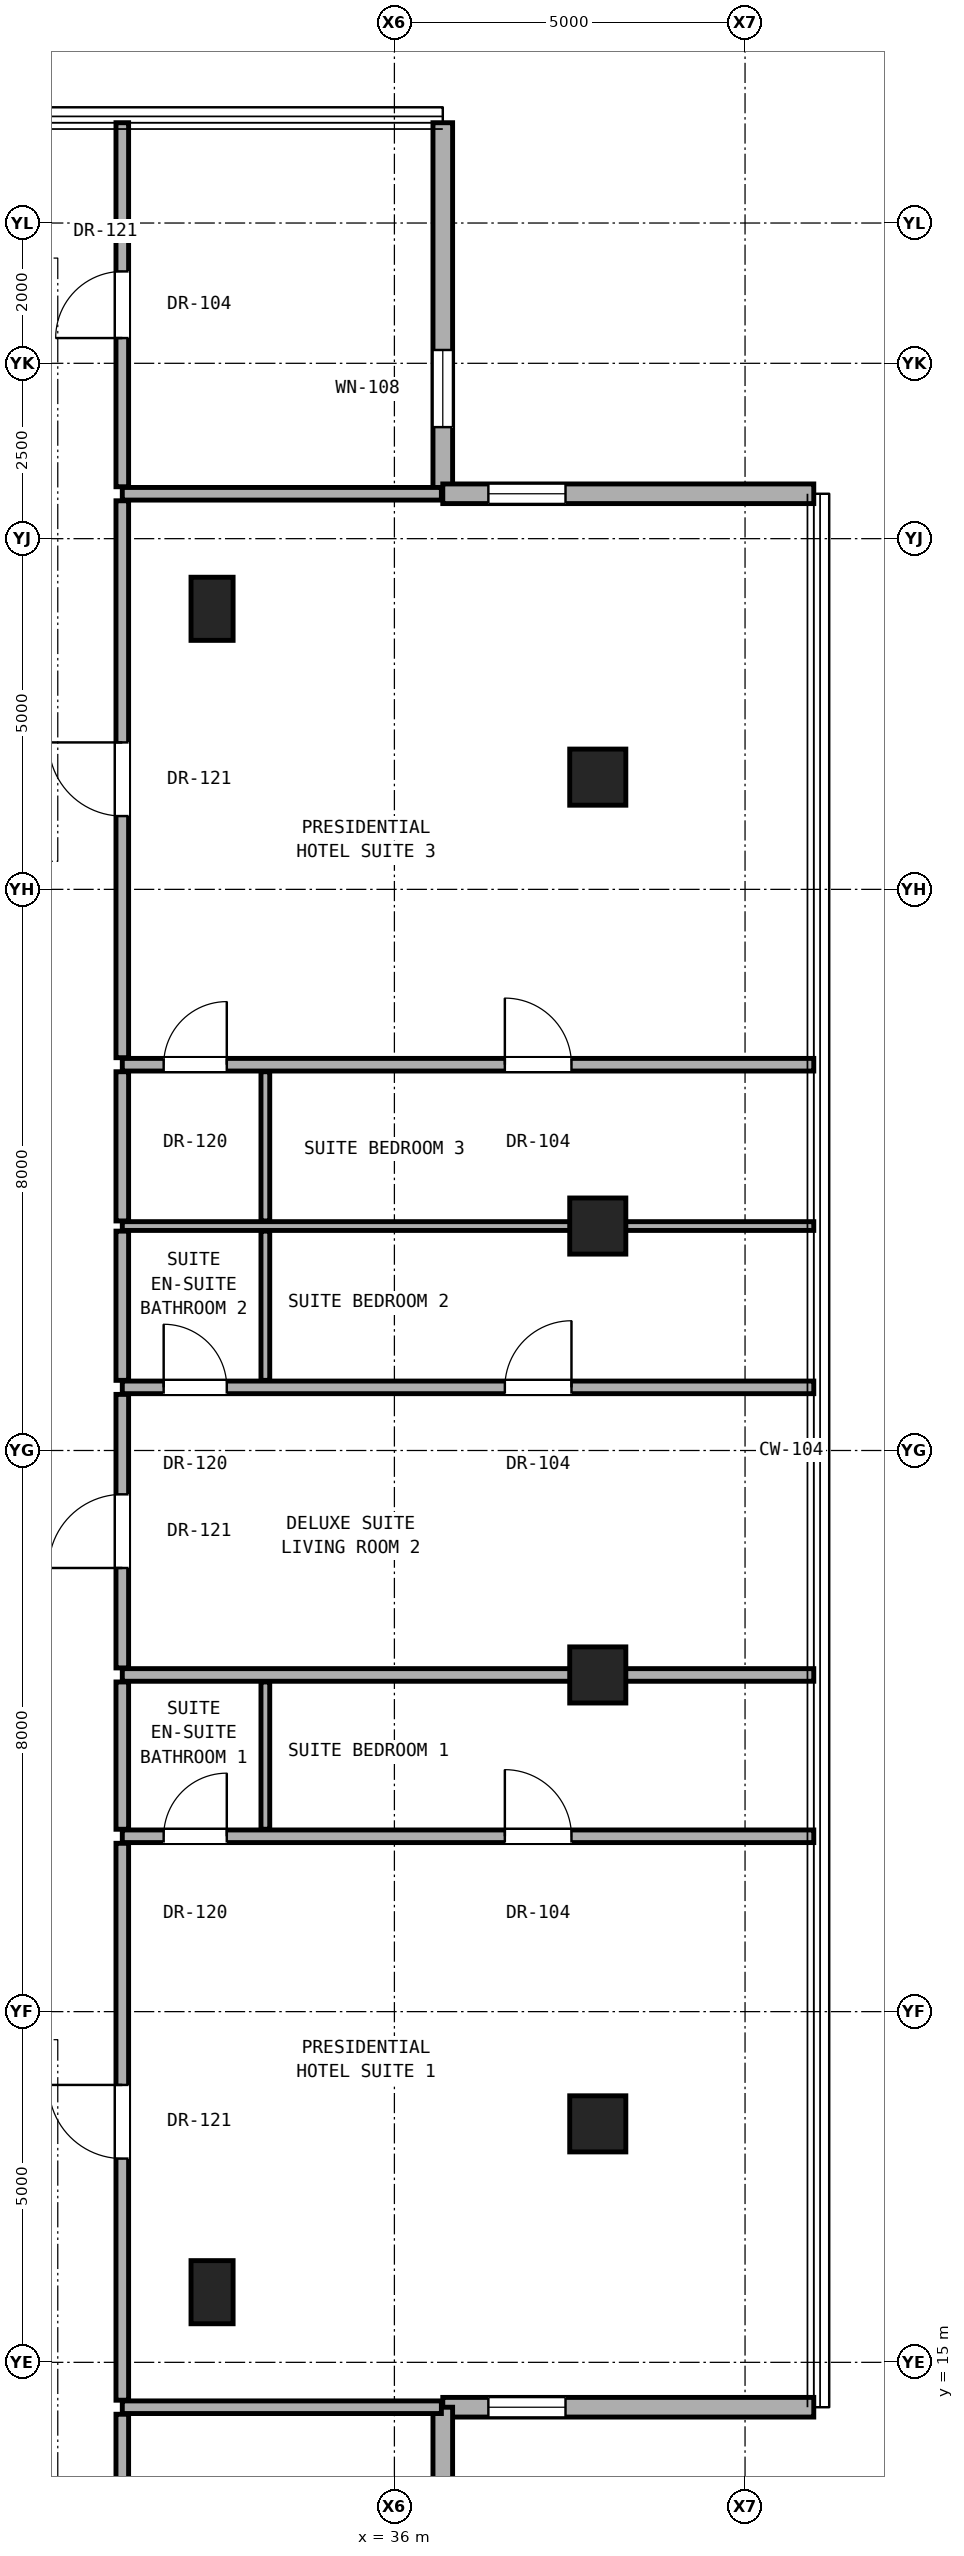
"""IFC4 building model, lengths in metres.
Left out: names, types, materials, properties, quantities, classifications, styles, units other than length and angle.
Written with IfcOpenShell. Run it as: python <this file> out.ifc"""

import sys

from ifc_helpers import new_model, si_unit, direction, frame, frame_2d, origin, origin_2d, place, context, subcontext, project, spatial, rectangle, hollow_rectangle, extrude, element, fill, save


model = new_model("IFC4")
c1 = context("Model", 3, precision=1e-05, world=origin(), true_north=direction((0.0, 1.0)))
c2 = subcontext(c1, "Body", "Model", "MODEL_VIEW")
j1 = project(units=[si_unit("LENGTHUNIT", "METRE"), si_unit("PLANEANGLEUNIT", "RADIAN")], contexts=[c1])
p1 = place(None, origin())
s1 = spatial("IfcSite", under=j1, at=p1, CompositionType="ELEMENT")
p2 = place(p1, origin())
s2 = spatial("IfcBuilding", under=s1, at=p2, CompositionType="ELEMENT")
p3 = place(p2, frame((0.0, 0.0, 235.9)))
s3 = spatial("IfcBuildingStorey", under=s2, at=p3, CompositionType="ELEMENT", Elevation=235.9)
for number, where, z_axis, x_axis in (
    (1, (38.9, 18.4, 0.0), (0.0, 0.0, 1.0), (1.0, 0.0, 0.0)),
    (2, (38.9, 24.8, 0.0), (0.0, 0.0, 1.0), (1.0, 0.0, 0.0)),
    (3, (38.9, 31.2, 0.0), (0.0, 0.0, 1.0), (1.0, 0.0, 0.0)),
    (4, (38.9, 37.6, 0.0), (0.0, 0.0, 1.0), (1.0, 0.0, 0.0)),
):
    element("IfcColumn", number, at=place(p3, frame(where, z_axis=z_axis, x_axis=x_axis)), inside=s3, PredefinedType="COLUMN", context=c2, shape_type="SweptSolid", body=[
        extrude(hollow_rectangle(XDim=0.8, YDim=0.8, WallThickness=0.045, at=origin_2d()), origin(), (0.0, 0.0, 1.0), 3.3),
    ])
for number, where, z_axis, x_axis in (
    (5, (33.4, 16.0, 0.0), (0.0, 0.0, 1.0), (1.0, 0.0, 0.0)),
    (6, (33.4, 40.0, 0.0), (0.0, 0.0, 1.0), (1.0, 0.0, 0.0)),
):
    element("IfcColumn", number, at=place(p3, frame(where, z_axis=z_axis, x_axis=x_axis)), inside=s3, PredefinedType="PILASTER", context=c2, shape_type="SweptSolid", body=[
        extrude(rectangle(XDim=0.6, YDim=0.9, at=origin_2d()), origin(), (0.0, 0.0, 1.0), 3.3),
    ])
p4 = place(p3, frame((36.69, 41.64, 0.0), z_axis=(0.0, 0.0, 1.0), x_axis=(0.0, 1.0, 0.0)))
e7 = element("IfcWall", 7, at=p4, inside=s3, PredefinedType="SOLIDWALL", context=c2, shape_type="SweptSolid", body=[
    extrude(rectangle(XDim=5.29, YDim=0.28, at=frame_2d((2.645, 0.0))), origin(), (0.0, 0.0, 1.0), 3.08),
])
p5 = place(p4, frame((0.95, 0.0, 0.85)))
e8 = element("IfcOpeningElement", 8, at=p5, cuts=e7, PredefinedType="OPENING", context=c2, shape_type="SweptSolid", body=[
    extrude(rectangle(XDim=1.1, YDim=2.0, at=frame_2d((0.55, 1.0))), frame((0.0, 0.15, 0.0), z_axis=(0.0, -1.0, 0.0), x_axis=(1.0, 0.0, 0.0)), (0.0, 0.0, 1.0), 0.3),
])
p6 = place(p3, frame((36.69, 14.36, 0.0), z_axis=(0.0, 0.0, 1.0), x_axis=(1.0, 0.0, 0.0)))
e9 = element("IfcWall", 9, at=p6, inside=s3, PredefinedType="SOLIDWALL", context=c2, shape_type="SweptSolid", body=[
    extrude(rectangle(XDim=5.29, YDim=0.28, at=frame_2d((2.645, 0.0))), origin(), (0.0, 0.0, 1.0), 3.08),
])
p7 = place(p6, frame((0.65, 0.0, 0.85)))
e10 = element("IfcOpeningElement", 10, at=p7, cuts=e9, PredefinedType="OPENING", context=c2, shape_type="SweptSolid", body=[
    extrude(rectangle(XDim=1.1, YDim=2.0, at=frame_2d((0.55, 1.0))), frame((0.0, 0.15, 0.0), z_axis=(0.0, -1.0, 0.0), x_axis=(1.0, 0.0, 0.0)), (0.0, 0.0, 1.0), 0.3),
])
p8 = place(p3, frame((36.69, 9.07, 0.0), z_axis=(0.0, 0.0, 1.0), x_axis=(0.0, 1.0, 0.0)))
e11 = element("IfcWall", 11, at=p8, inside=s3, PredefinedType="SOLIDWALL", context=c2, shape_type="SweptSolid", body=[
    extrude(rectangle(XDim=5.29, YDim=0.28, at=frame_2d((2.645, 0.0))), origin(), (0.0, 0.0, 1.0), 3.08),
])
p9 = place(p3, frame((41.98, 41.64, 0.0), z_axis=(0.0, 0.0, 1.0), x_axis=(-1.0, 0.0, 0.0)))
e12 = element("IfcWall", 12, at=p9, inside=s3, PredefinedType="SOLIDWALL", context=c2, shape_type="SweptSolid", body=[
    extrude(rectangle(XDim=5.29, YDim=0.28, at=frame_2d((2.645, 0.0))), origin(), (0.0, 0.0, 1.0), 3.08),
])
p10 = place(p9, frame((3.54, 0.0, 0.85)))
e13 = element("IfcOpeningElement", 13, at=p10, cuts=e12, PredefinedType="OPENING", context=c2, shape_type="SweptSolid", body=[
    extrude(rectangle(XDim=1.1, YDim=2.0, at=frame_2d((0.55, 1.0))), frame((0.0, 0.15, 0.0), z_axis=(0.0, -1.0, 0.0), x_axis=(1.0, 0.0, 0.0)), (0.0, 0.0, 1.0), 0.3),
])
p11 = place(p3, frame((32.12, 14.36, 0.0), z_axis=(0.0, 0.0, 1.0), x_axis=(1.0, 0.0, 0.0)))
e14 = element("IfcWall", 14, at=p11, inside=s3, PredefinedType="PARTITIONING", context=c2, shape_type="SweptSolid", body=[
    extrude(rectangle(XDim=4.55, YDim=0.18, at=frame_2d((2.275, 0.0))), origin(), (0.0, 0.0, 1.0), 3.1),
])
p12 = place(p3, frame((32.12, 22.5, 0.0), z_axis=(0.0, 0.0, 1.0), x_axis=(1.0, 0.0, 0.0)))
e15 = element("IfcWall", 15, at=p12, inside=s3, PredefinedType="PARTITIONING", context=c2, shape_type="SweptSolid", body=[
    extrude(rectangle(XDim=9.86, YDim=0.18, at=frame_2d((4.93, 0.0))), origin(), (0.0, 0.0, 1.0), 2.319),
])
p13 = place(p12, frame((5.455, 0.0, 0.0)))
e16 = element("IfcOpeningElement", 16, at=p13, cuts=e15, PredefinedType="OPENING", context=c2, shape_type="SweptSolid", body=[
    extrude(rectangle(XDim=0.95, YDim=2.15, at=frame_2d((0.475, 1.075))), frame((0.0, 0.1, 0.0), z_axis=(0.0, -1.0, 0.0), x_axis=(1.0, 0.0, 0.0)), (0.0, 0.0, 1.0), 0.2),
])
p14 = place(p12, frame((0.59, 0.0, 0.0)))
e17 = element("IfcOpeningElement", 17, at=p14, cuts=e15, PredefinedType="OPENING", context=c2, shape_type="SweptSolid", body=[
    extrude(rectangle(XDim=0.9, YDim=2.1, at=frame_2d((0.45, 1.05))), frame((0.0, 0.1, 0.0), z_axis=(0.0, -1.0, 0.0), x_axis=(1.0, 0.0, 0.0)), (0.0, 0.0, 1.0), 0.2),
])
p15 = place(p3, frame((32.12, 24.8, 0.0), z_axis=(0.0, 0.0, 1.0), x_axis=(1.0, 0.0, 0.0)))
e18 = element("IfcWall", 18, at=p15, inside=s3, PredefinedType="PARTITIONING", context=c2, shape_type="SweptSolid", body=[
    extrude(rectangle(XDim=9.86, YDim=0.18, at=frame_2d((4.93, 0.0))), origin(), (0.0, 0.0, 1.0), 2.319),
])
p16 = place(p3, frame((32.12, 28.9, 0.0), z_axis=(0.0, 0.0, 1.0), x_axis=(1.0, 0.0, 0.0)))
e19 = element("IfcWall", 19, at=p16, inside=s3, PredefinedType="PARTITIONING", context=c2, shape_type="SweptSolid", body=[
    extrude(rectangle(XDim=9.86, YDim=0.18, at=frame_2d((4.93, 0.0))), origin(), (0.0, 0.0, 1.0), 2.319),
])
p17 = place(p16, frame((5.455, 0.0, 0.0)))
e20 = element("IfcOpeningElement", 20, at=p17, cuts=e19, PredefinedType="OPENING", context=c2, shape_type="SweptSolid", body=[
    extrude(rectangle(XDim=0.95, YDim=2.15, at=frame_2d((0.475, 1.075))), frame((0.0, 0.1, 0.0), z_axis=(0.0, -1.0, 0.0), x_axis=(1.0, 0.0, 0.0)), (0.0, 0.0, 1.0), 0.2),
])
p18 = place(p16, frame((0.59, 0.0, 0.0)))
e21 = element("IfcOpeningElement", 21, at=p18, cuts=e19, PredefinedType="OPENING", context=c2, shape_type="SweptSolid", body=[
    extrude(rectangle(XDim=0.9, YDim=2.1, at=frame_2d((0.45, 1.05))), frame((0.0, 0.1, 0.0), z_axis=(0.0, -1.0, 0.0), x_axis=(1.0, 0.0, 0.0)), (0.0, 0.0, 1.0), 0.2),
])
p19 = place(p3, frame((32.12, 31.2, 0.0), z_axis=(0.0, 0.0, 1.0), x_axis=(1.0, 0.0, 0.0)))
e22 = element("IfcWall", 22, at=p19, inside=s3, PredefinedType="PARTITIONING", context=c2, shape_type="SweptSolid", body=[
    extrude(rectangle(XDim=9.86, YDim=0.125, at=frame_2d((4.93, 0.0))), origin(), (0.0, 0.0, 1.0), 2.319),
])
p20 = place(p3, frame((32.12, 33.5, 0.0), z_axis=(0.0, 0.0, 1.0), x_axis=(1.0, 0.0, 0.0)))
e23 = element("IfcWall", 23, at=p20, inside=s3, PredefinedType="PARTITIONING", context=c2, shape_type="SweptSolid", body=[
    extrude(rectangle(XDim=9.86, YDim=0.18, at=frame_2d((4.93, 0.0))), origin(), (0.0, 0.0, 1.0), 2.319),
])
p21 = place(p20, frame((5.455, 0.0, 0.0)))
e24 = element("IfcOpeningElement", 24, at=p21, cuts=e23, PredefinedType="OPENING", context=c2, shape_type="SweptSolid", body=[
    extrude(rectangle(XDim=0.95, YDim=2.15, at=frame_2d((0.475, 1.075))), frame((0.0, 0.1, 0.0), z_axis=(0.0, -1.0, 0.0), x_axis=(1.0, 0.0, 0.0)), (0.0, 0.0, 1.0), 0.2),
])
p22 = place(p20, frame((0.59, 0.0, 0.0)))
e25 = element("IfcOpeningElement", 25, at=p22, cuts=e23, PredefinedType="OPENING", context=c2, shape_type="SweptSolid", body=[
    extrude(rectangle(XDim=0.9, YDim=2.1, at=frame_2d((0.45, 1.05))), frame((0.0, 0.1, 0.0), z_axis=(0.0, -1.0, 0.0), x_axis=(1.0, 0.0, 0.0)), (0.0, 0.0, 1.0), 0.2),
])
p23 = place(p3, frame((32.12, 41.64, 0.0), z_axis=(0.0, 0.0, 1.0), x_axis=(1.0, 0.0, 0.0)))
e26 = element("IfcWall", 26, at=p23, inside=s3, PredefinedType="PARTITIONING", context=c2, shape_type="SweptSolid", body=[
    extrude(rectangle(XDim=4.55, YDim=0.18, at=frame_2d((2.275, 0.0))), origin(), (0.0, 0.0, 1.0), 3.1),
])
p24 = place(p3, frame((32.12, 9.07, 0.0), z_axis=(0.0, 0.0, 1.0), x_axis=(0.0, 1.0, 0.0)))
e27 = element("IfcWall", 27, at=p24, inside=s3, PredefinedType="PARTITIONING", context=c2, shape_type="SweptSolid", body=[
    extrude(rectangle(XDim=5.19, YDim=0.18, at=frame_2d((2.595, 0.0))), origin(), (0.0, 0.0, 1.0), 3.1),
])
p25 = place(p24, frame((2.12, 0.0, 0.0)))
e28 = element("IfcOpeningElement", 28, at=p25, cuts=e27, PredefinedType="OPENING", context=c2, shape_type="SweptSolid", body=[
    extrude(rectangle(XDim=0.95, YDim=2.15, at=frame_2d((0.475, 1.075))), frame((0.0, 0.1, 0.0), z_axis=(0.0, -1.0, 0.0), x_axis=(1.0, 0.0, 0.0)), (0.0, 0.0, 1.0), 0.2),
])
p26 = place(p3, frame((32.12, 14.46, 0.0), z_axis=(0.0, 0.0, 1.0), x_axis=(0.0, 1.0, 0.0)))
e29 = element("IfcWall", 29, at=p26, inside=s3, PredefinedType="PARTITIONING", context=c2, shape_type="SweptSolid", body=[
    extrude(rectangle(XDim=7.94, YDim=0.18, at=frame_2d((3.97, 0.0))), origin(), (0.0, 0.0, 1.0), 2.492),
])
p27 = place(p26, frame((3.445, 0.0, 0.0)))
e30 = element("IfcOpeningElement", 30, at=p27, cuts=e29, PredefinedType="OPENING", context=c2, shape_type="SweptSolid", body=[
    extrude(rectangle(XDim=1.05, YDim=2.2, at=frame_2d((0.525, 1.1))), frame((0.0, 0.1, 0.0), z_axis=(0.0, -1.0, 0.0), x_axis=(1.0, 0.0, 0.0)), (0.0, 0.0, 1.0), 0.2),
])
p28 = place(p3, frame((32.12, 22.6, 0.0), z_axis=(0.0, 0.0, 1.0), x_axis=(0.0, 1.0, 0.0)))
e31 = element("IfcWall", 31, at=p28, inside=s3, PredefinedType="PARTITIONING", context=c2, shape_type="SweptSolid", body=[
    extrude(rectangle(XDim=2.1, YDim=0.18, at=frame_2d((1.05, 0.0))), origin(), (0.0, 0.0, 1.0), 2.396),
])
p29 = place(p3, frame((32.12, 24.9, 0.0), z_axis=(0.0, 0.0, 1.0), x_axis=(0.0, 1.0, 0.0)))
e32 = element("IfcWall", 32, at=p29, inside=s3, PredefinedType="PARTITIONING", context=c2, shape_type="SweptSolid", body=[
    extrude(rectangle(XDim=3.9, YDim=0.18, at=frame_2d((1.95, 0.0))), origin(), (0.0, 0.0, 1.0), 2.396),
])
p30 = place(p29, frame((1.425, 0.0, 0.0)))
e33 = element("IfcOpeningElement", 33, at=p30, cuts=e32, PredefinedType="OPENING", context=c2, shape_type="SweptSolid", body=[
    extrude(rectangle(XDim=1.05, YDim=2.2, at=frame_2d((0.525, 1.1))), frame((0.0, 0.1, 0.0), z_axis=(0.0, -1.0, 0.0), x_axis=(1.0, 0.0, 0.0)), (0.0, 0.0, 1.0), 0.2),
])
for number, where, z_axis, x_axis in (
    (34, (32.12, 29.0, 0.0), (0.0, 0.0, 1.0), (0.0, 1.0, 0.0)),
    (35, (32.12, 31.272, 0.0), (0.0, 0.0, 1.0), (0.0, 1.0, 0.0)),
):
    element("IfcWall", number, at=place(p3, frame(where, z_axis=z_axis, x_axis=x_axis)), inside=s3, PredefinedType="PARTITIONING", context=c2, shape_type="SweptSolid", body=[
        extrude(rectangle(XDim=2.127, YDim=0.18, at=frame_2d((1.064, 0.0))), origin(), (0.0, 0.0, 1.0), 2.396),
    ])
p31 = place(p3, frame((32.12, 33.6, 0.0), z_axis=(0.0, 0.0, 1.0), x_axis=(0.0, 1.0, 0.0)))
e36 = element("IfcWall", 36, at=p31, inside=s3, PredefinedType="PARTITIONING", context=c2, shape_type="SweptSolid", body=[
    extrude(rectangle(XDim=7.94, YDim=0.18, at=frame_2d((3.97, 0.0))), origin(), (0.0, 0.0, 1.0), 2.492),
])
p32 = place(p31, frame((3.445, 0.0, 0.0)))
e37 = element("IfcOpeningElement", 37, at=p32, cuts=e36, PredefinedType="OPENING", context=c2, shape_type="SweptSolid", body=[
    extrude(rectangle(XDim=1.05, YDim=2.2, at=frame_2d((0.525, 1.1))), frame((0.0, 0.1, 0.0), z_axis=(0.0, -1.0, 0.0), x_axis=(1.0, 0.0, 0.0)), (0.0, 0.0, 1.0), 0.2),
])
p33 = place(p3, frame((32.12, 41.74, 0.0), z_axis=(0.0, 0.0, 1.0), x_axis=(0.0, 1.0, 0.0)))
e38 = element("IfcWall", 38, at=p33, inside=s3, PredefinedType="PARTITIONING", context=c2, shape_type="SweptSolid", body=[
    extrude(rectangle(XDim=5.19, YDim=0.18, at=frame_2d((2.595, 0.0))), origin(), (0.0, 0.0, 1.0), 3.1),
])
p34 = place(p33, frame((2.12, 0.0, 0.0)))
e39 = element("IfcOpeningElement", 39, at=p34, cuts=e38, PredefinedType="OPENING", context=c2, shape_type="SweptSolid", body=[
    extrude(rectangle(XDim=0.95, YDim=2.15, at=frame_2d((0.475, 1.075))), frame((0.0, 0.1, 0.0), z_axis=(0.0, -1.0, 0.0), x_axis=(1.0, 0.0, 0.0)), (0.0, 0.0, 1.0), 0.2),
])
p35 = place(p3, frame((34.16, 22.6, 0.0), z_axis=(0.0, 0.0, 1.0), x_axis=(0.0, 1.0, 0.0)))
e40 = element("IfcWall", 40, at=p35, inside=s3, PredefinedType="PARTITIONING", context=c2, shape_type="SweptSolid", body=[
    extrude(rectangle(XDim=2.1, YDim=0.125, at=frame_2d((1.05, 0.0))), origin(), (0.0, 0.0, 1.0), 2.396),
])
for number, where, z_axis, x_axis in (
    (41, (34.16, 29.0, 0.0), (0.0, 0.0, 1.0), (0.0, 1.0, 0.0)),
    (42, (34.16, 31.272, 0.0), (0.0, 0.0, 1.0), (0.0, 1.0, 0.0)),
):
    element("IfcWall", number, at=place(p3, frame(where, z_axis=z_axis, x_axis=x_axis)), inside=s3, PredefinedType="PARTITIONING", context=c2, shape_type="SweptSolid", body=[
        extrude(rectangle(XDim=2.127, YDim=0.125, at=frame_2d((1.064, 0.0))), origin(), (0.0, 0.0, 1.0), 2.396),
    ])
p36 = place(p5, origin())
e43 = element("IfcWindow", 43, at=p36, inside=s3, PartitioningType="SINGLE_PANEL", PredefinedType="WINDOW", context=c2, shape_type="SweptSolid", body=[
    extrude(rectangle(XDim=1.1, YDim=2.0, at=frame_2d((0.55, 1.0))), frame((0.0, 0.03, 0.0), z_axis=(0.0, -1.0, 0.0), x_axis=(1.0, 0.0, 0.0)), (0.0, 0.0, 1.0), 0.06),
])
fill(e8, e43)
p37 = place(p7, origin())
e44 = element("IfcWindow", 44, at=p37, inside=s3, PartitioningType="SINGLE_PANEL", PredefinedType="WINDOW", context=c2, shape_type="SweptSolid", body=[
    extrude(rectangle(XDim=1.1, YDim=2.0, at=frame_2d((0.55, 1.0))), frame((0.0, 0.03, 0.0), z_axis=(0.0, -1.0, 0.0), x_axis=(1.0, 0.0, 0.0)), (0.0, 0.0, 1.0), 0.06),
])
fill(e10, e44)
p38 = place(p10, origin())
e45 = element("IfcWindow", 45, at=p38, inside=s3, PartitioningType="SINGLE_PANEL", PredefinedType="WINDOW", context=c2, shape_type="SweptSolid", body=[
    extrude(rectangle(XDim=1.1, YDim=2.0, at=frame_2d((0.55, 1.0))), frame((0.0, 0.03, 0.0), z_axis=(0.0, -1.0, 0.0), x_axis=(1.0, 0.0, 0.0)), (0.0, 0.0, 1.0), 0.06),
])
fill(e13, e45)
p39 = place(p27, origin())
e46 = element("IfcDoor", 46, at=p39, inside=s3, OperationType="SINGLE_SWING_RIGHT", PredefinedType="DOOR", context=c2, shape_type="SweptSolid", body=[
    extrude(rectangle(XDim=1.05, YDim=2.2, at=frame_2d((0.525, 1.1))), frame((0.0, 0.025, 0.0), z_axis=(0.0, -1.0, 0.0), x_axis=(1.0, 0.0, 0.0)), (0.0, 0.0, 1.0), 0.05),
])
fill(e30, e46)
p40 = place(p13, origin())
e47 = element("IfcDoor", 47, at=p40, inside=s3, OperationType="SINGLE_SWING_LEFT", PredefinedType="DOOR", context=c2, shape_type="SweptSolid", body=[
    extrude(rectangle(XDim=0.95, YDim=2.15, at=frame_2d((0.475, 1.075))), frame((0.0, 0.025, 0.0), z_axis=(0.0, -1.0, 0.0), x_axis=(1.0, 0.0, 0.0)), (0.0, 0.0, 1.0), 0.05),
])
fill(e16, e47)
p41 = place(p14, origin())
e48 = element("IfcDoor", 48, at=p41, inside=s3, OperationType="SINGLE_SWING_RIGHT", PredefinedType="DOOR", context=c2, shape_type="SweptSolid", body=[
    extrude(rectangle(XDim=0.9, YDim=2.1, at=frame_2d((0.45, 1.05))), frame((0.0, 0.025, 0.0), z_axis=(0.0, -1.0, 0.0), x_axis=(1.0, 0.0, 0.0)), (0.0, 0.0, 1.0), 0.05),
])
fill(e17, e48)
p42 = place(p30, origin())
e49 = element("IfcDoor", 49, at=p42, inside=s3, OperationType="SINGLE_SWING_LEFT", PredefinedType="DOOR", context=c2, shape_type="SweptSolid", body=[
    extrude(rectangle(XDim=1.05, YDim=2.2, at=frame_2d((0.525, 1.1))), frame((0.0, 0.025, 0.0), z_axis=(0.0, -1.0, 0.0), x_axis=(1.0, 0.0, 0.0)), (0.0, 0.0, 1.0), 0.05),
])
fill(e33, e49)
p43 = place(p17, origin())
e50 = element("IfcDoor", 50, at=p43, inside=s3, OperationType="SINGLE_SWING_RIGHT", PredefinedType="DOOR", context=c2, shape_type="SweptSolid", body=[
    extrude(rectangle(XDim=0.95, YDim=2.15, at=frame_2d((0.475, 1.075))), frame((0.0, 0.025, 0.0), z_axis=(0.0, -1.0, 0.0), x_axis=(1.0, 0.0, 0.0)), (0.0, 0.0, 1.0), 0.05),
])
fill(e20, e50)
p44 = place(p18, origin())
e51 = element("IfcDoor", 51, at=p44, inside=s3, OperationType="SINGLE_SWING_LEFT", PredefinedType="DOOR", context=c2, shape_type="SweptSolid", body=[
    extrude(rectangle(XDim=0.9, YDim=2.1, at=frame_2d((0.45, 1.05))), frame((0.0, 0.025, 0.0), z_axis=(0.0, -1.0, 0.0), x_axis=(1.0, 0.0, 0.0)), (0.0, 0.0, 1.0), 0.05),
])
fill(e21, e51)
p45 = place(p32, origin())
e52 = element("IfcDoor", 52, at=p45, inside=s3, OperationType="SINGLE_SWING_RIGHT", PredefinedType="DOOR", context=c2, shape_type="SweptSolid", body=[
    extrude(rectangle(XDim=1.05, YDim=2.2, at=frame_2d((0.525, 1.1))), frame((0.0, 0.025, 0.0), z_axis=(0.0, -1.0, 0.0), x_axis=(1.0, 0.0, 0.0)), (0.0, 0.0, 1.0), 0.05),
])
fill(e37, e52)
p46 = place(p21, origin())
e53 = element("IfcDoor", 53, at=p46, inside=s3, OperationType="SINGLE_SWING_LEFT", PredefinedType="DOOR", context=c2, shape_type="SweptSolid", body=[
    extrude(rectangle(XDim=0.95, YDim=2.15, at=frame_2d((0.475, 1.075))), frame((0.0, 0.025, 0.0), z_axis=(0.0, -1.0, 0.0), x_axis=(1.0, 0.0, 0.0)), (0.0, 0.0, 1.0), 0.05),
])
fill(e24, e53)
p47 = place(p22, origin())
e54 = element("IfcDoor", 54, at=p47, inside=s3, OperationType="SINGLE_SWING_RIGHT", PredefinedType="DOOR", context=c2, shape_type="SweptSolid", body=[
    extrude(rectangle(XDim=0.9, YDim=2.1, at=frame_2d((0.45, 1.05))), frame((0.0, 0.025, 0.0), z_axis=(0.0, -1.0, 0.0), x_axis=(1.0, 0.0, 0.0)), (0.0, 0.0, 1.0), 0.05),
])
fill(e25, e54)
p48 = place(p34, origin())
e55 = element("IfcDoor", 55, at=p48, inside=s3, OperationType="SINGLE_SWING_LEFT", PredefinedType="DOOR", context=c2, shape_type="SweptSolid", body=[
    extrude(rectangle(XDim=0.95, YDim=2.15, at=frame_2d((0.475, 1.075))), frame((0.0, 0.025, 0.0), z_axis=(0.0, -1.0, 0.0), x_axis=(1.0, 0.0, 0.0)), (0.0, 0.0, 1.0), 0.05),
])
fill(e39, e55)
save(model, sys.argv[1])
